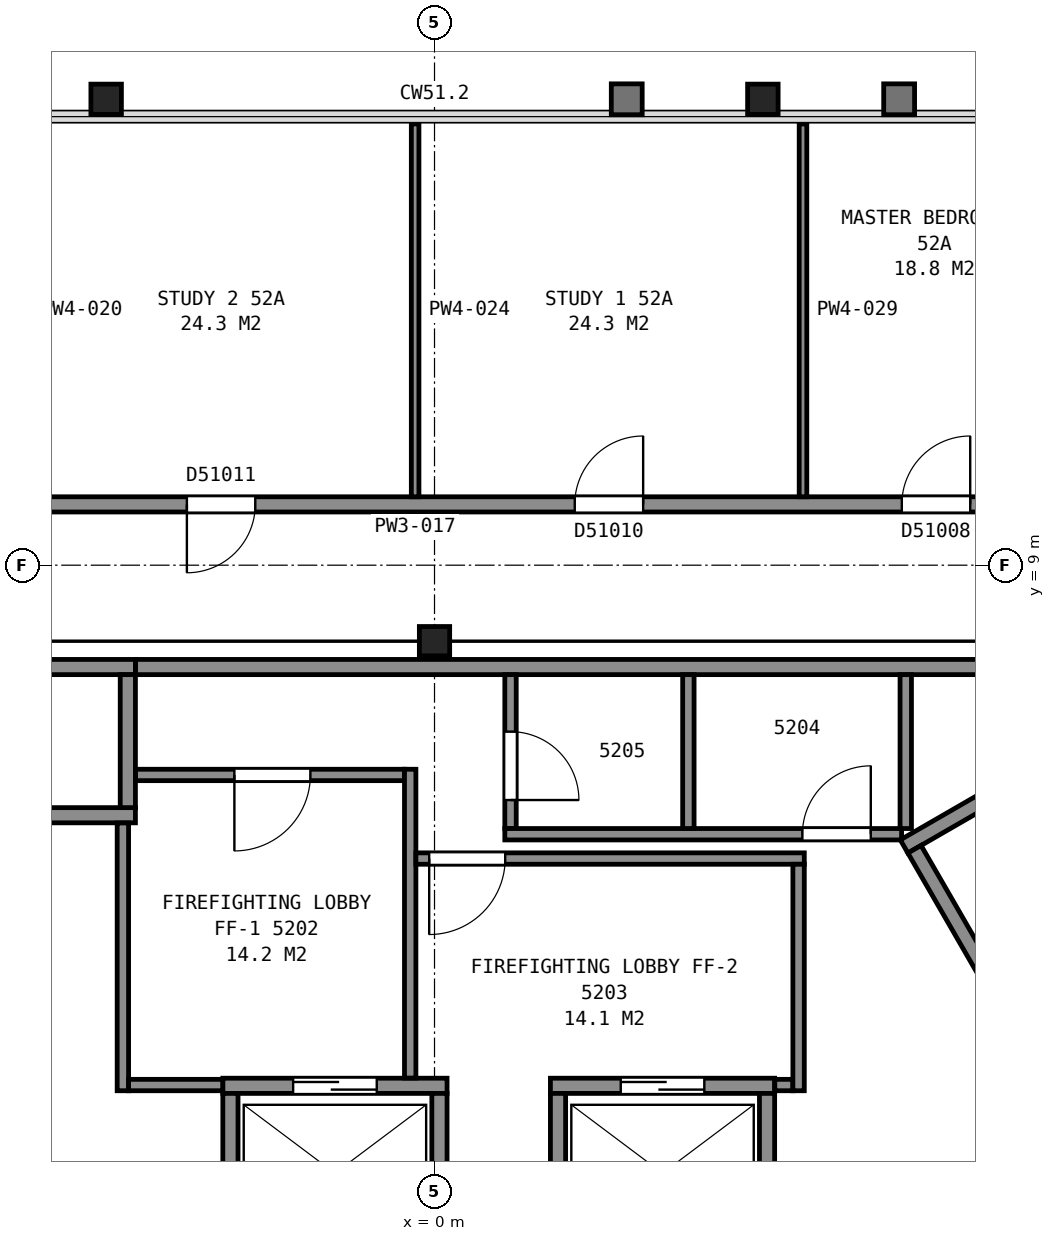
"""IFC4 building model, lengths in metres.
Left out: names, types, materials, properties, quantities, classifications, styles, units other than length and angle.
Written with IfcOpenShell. Run it as: python <this file> out.ifc"""

import sys

from ifc_helpers import new_model, si_unit, direction, frame, frame_2d, origin, origin_2d, place, context, subcontext, project, spatial, rectangle, i_section, extrude, element, fill, save


model = new_model("IFC4")
c1 = context("Model", 3, precision=1e-05, world=origin(), true_north=direction((0.0, 1.0)))
c2 = subcontext(c1, "Body", "Model", "MODEL_VIEW")
j1 = project(units=[si_unit("LENGTHUNIT", "METRE"), si_unit("PLANEANGLEUNIT", "RADIAN")], contexts=[c1])
p1 = place(None, origin())
s1 = spatial("IfcSite", under=j1, at=p1, CompositionType="ELEMENT")
p2 = place(p1, origin())
s2 = spatial("IfcBuilding", under=s1, at=p2, CompositionType="ELEMENT")
p3 = place(p2, frame((0.0, 0.0, 210.1)))
s3 = spatial("IfcBuildingStorey", under=s2, at=p3, CompositionType="ELEMENT", Elevation=210.1)
for number, where, z_axis, x_axis in (
    (1, (4.32, 15.13, 0.0), (0.0, 0.0, 1.0), (1.0, 0.0, 0.0)),
    (2, (-4.32, 15.13, 0.0), (0.0, 0.0, 1.0), (1.0, 0.0, 0.0)),
):
    element("IfcColumn", number, at=place(p3, frame(where, z_axis=z_axis, x_axis=x_axis)), inside=s3, PredefinedType="COLUMN", context=c2, shape_type="SweptSolid", body=[
        extrude(i_section(OverallWidth=0.401, OverallDepth=0.399, WebThickness=0.025, FlangeThickness=0.04, FilletRadius=0.015, at=origin_2d()), origin(), (0.0, 0.0, 1.0), 3.665),
    ])
p4 = place(p3, frame((0.0, 8.0, 0.0), z_axis=(0.0, 0.0, 1.0), x_axis=(1.0, 0.0, 0.0)))
e3 = element("IfcColumn", 3, at=p4, inside=s3, PredefinedType="COLUMN", context=c2, shape_type="SweptSolid", body=[
    extrude(i_section(OverallWidth=0.399, OverallDepth=0.386, WebThickness=0.021, FlangeThickness=0.033, FilletRadius=0.015, at=origin_2d()), origin(), (0.0, 0.0, 1.0), 3.7),
])
p5 = place(p3, frame((6.178, 5.299, 0.0), z_axis=(0.0, 0.0, 1.0), x_axis=(0.866019993635, 0.500009370536, 0.0)))
e4 = element("IfcWall", 4, at=p5, inside=s3, PredefinedType="PARTITIONING", context=c2, shape_type="SweptSolid", body=[
    extrude(rectangle(XDim=9.6, YDim=0.2, at=frame_2d((4.8, 0.0))), origin(), (0.0, 0.0, 1.0), 3.45),
])
p6 = place(p3, frame((7.715, 2.838, 0.0), z_axis=(0.0, 0.0, 1.0), x_axis=(-0.500049511043, 0.865996816683, 0.0)))
e5 = element("IfcWall", 5, at=p6, inside=s3, PredefinedType="PARTITIONING", context=c2, shape_type="SweptSolid", body=[
    extrude(rectangle(XDim=2.8, YDim=0.2, at=frame_2d((1.4, 0.0))), origin(), (0.0, 0.0, 1.0), 3.45),
])
p7 = place(p3, frame((-2.785, 2.15, 0.0), z_axis=(0.0, 0.0, 1.0), x_axis=(1.0, 0.0, 0.0)))
e6 = element("IfcWall", 6, at=p7, inside=s3, PredefinedType="PARTITIONING", context=c2, shape_type="SweptSolid", body=[
    extrude(rectangle(XDim=2.95, YDim=0.2, at=frame_2d((1.475, 0.0))), origin(), (0.0, 0.0, 1.0), 3.7),
])
p8 = place(p7, frame((0.925, 0.0, 0.0)))
e7 = element("IfcOpeningElement", 7, at=p8, cuts=e6, PredefinedType="OPENING", context=c2, shape_type="SweptSolid", body=[
    extrude(rectangle(XDim=1.1, YDim=2.1, at=frame_2d((0.55, 1.05))), frame((0.0, 0.11, 0.0), z_axis=(0.0, -1.0, 0.0), x_axis=(1.0, 0.0, 0.0)), (0.0, 0.0, 1.0), 0.22),
])
p9 = place(p3, frame((1.525, 2.15, 0.0), z_axis=(0.0, 0.0, 1.0), x_axis=(1.0, 0.0, 0.0)))
e8 = element("IfcWall", 8, at=p9, inside=s3, PredefinedType="PARTITIONING", context=c2, shape_type="SweptSolid", body=[
    extrude(rectangle(XDim=2.95, YDim=0.2, at=frame_2d((1.475, 0.0))), origin(), (0.0, 0.0, 1.0), 3.7),
])
p10 = place(p9, frame((0.925, 0.0, 0.0)))
e9 = element("IfcOpeningElement", 9, at=p10, cuts=e8, PredefinedType="OPENING", context=c2, shape_type="SweptSolid", body=[
    extrude(rectangle(XDim=1.1, YDim=2.1, at=frame_2d((0.55, 1.05))), frame((0.0, 0.11, 0.0), z_axis=(0.0, -1.0, 0.0), x_axis=(1.0, 0.0, 0.0)), (0.0, 0.0, 1.0), 0.22),
])
for number, where, z_axis, x_axis in (
    (10, (-6.285, 5.71, 0.0), (0.0, 0.0, 1.0), (1.0, 0.0, 0.0)),
    (11, (-6.285, 7.66, 0.0), (0.0, 0.0, 1.0), (1.0, 0.0, 0.0)),
):
    element("IfcWall", number, at=place(p3, frame(where, z_axis=z_axis, x_axis=x_axis)), inside=s3, PredefinedType="PARTITIONING", context=c2, shape_type="SweptSolid", body=[
        extrude(rectangle(XDim=2.35, YDim=0.2, at=frame_2d((1.175, 0.0))), origin(), (0.0, 0.0, 1.0), 3.7),
    ])
p11 = place(p3, frame((5.663, -1.612, 0.0), z_axis=(0.0, 0.0, 1.0), x_axis=(0.49998122708, 0.866036242063, 0.0)))
e12 = element("IfcWall", 12, at=p11, inside=s3, PredefinedType="PARTITIONING", context=c2, shape_type="SweptSolid", body=[
    extrude(rectangle(XDim=4.9, YDim=0.2, at=frame_2d((2.45, 0.0))), origin(), (0.0, 0.0, 1.0), 3.7),
])
for number, where, z_axis, x_axis in (
    (13, (4.375, 0.1, 0.0), (0.0, 0.0, 1.0), (0.0, 1.0, 0.0)),
    (14, (1.625, 0.1, 0.0), (0.0, 0.0, 1.0), (0.0, 1.0, 0.0)),
    (15, (0.065, 0.1, 0.0), (0.0, 0.0, 1.0), (0.0, 1.0, 0.0)),
    (16, (-2.685, 0.1, 0.0), (0.0, 0.0, 1.0), (0.0, 1.0, 0.0)),
):
    element("IfcWall", number, at=place(p3, frame(where, z_axis=z_axis, x_axis=x_axis)), inside=s3, PredefinedType="PARTITIONING", context=c2, shape_type="SweptSolid", body=[
        extrude(rectangle(XDim=1.95, YDim=0.2, at=frame_2d((0.975, 0.0))), origin(), (0.0, 0.0, 1.0), 3.7),
    ])
p12 = place(p3, frame((-4.035, 5.81, 0.0), z_axis=(0.0, 0.0, 1.0), x_axis=(0.0, 1.0, 0.0)))
e17 = element("IfcWall", 17, at=p12, inside=s3, PredefinedType="PARTITIONING", context=c2, shape_type="SweptSolid", body=[
    extrude(rectangle(XDim=1.75, YDim=0.2, at=frame_2d((0.875, 0.0))), origin(), (0.0, 0.0, 1.0), 3.7),
])
p13 = place(p3, frame((-4.1, 2.085, 0.0), z_axis=(0.0, 0.0, 1.0), x_axis=(0.0, 1.0, 0.0)))
e18 = element("IfcWall", 18, at=p13, inside=s3, PredefinedType="PARTITIONING", context=c2, shape_type="SweptSolid", body=[
    extrude(rectangle(XDim=3.523, YDim=0.15, at=frame_2d((1.761, 0.0))), origin(), (0.0, 0.0, 1.0), 3.45),
])
p14 = place(p3, frame((-4.025, 2.16, 0.0), z_axis=(0.0, 0.0, 1.0), x_axis=(1.0, 0.0, 0.0)))
e19 = element("IfcWall", 19, at=p14, inside=s3, PredefinedType="PARTITIONING", context=c2, shape_type="SweptSolid", body=[
    extrude(rectangle(XDim=1.238, YDim=0.15, at=frame_2d((0.619, 0.0))), origin(), (0.0, 0.0, 1.0), 3.45),
])
p15 = place(p3, frame((-3.933, 6.24, 0.0), z_axis=(0.0, 0.0, 1.0), x_axis=(1.0, 0.0, 0.0)))
e20 = element("IfcWall", 20, at=p15, inside=s3, PredefinedType="PARTITIONING", context=c2, shape_type="SweptSolid", body=[
    extrude(rectangle(XDim=3.538, YDim=0.15, at=frame_2d((1.769, 0.0))), origin(), (0.0, 0.0, 1.0), 3.45),
])
p16 = place(p15, frame((1.3, 0.0, 0.0)))
e21 = element("IfcOpeningElement", 21, at=p16, cuts=e20, PredefinedType="OPENING", context=c2, shape_type="SweptSolid", body=[
    extrude(rectangle(XDim=1.0, YDim=2.1, at=frame_2d((0.5, 1.05))), frame((0.0, 0.085, 0.0), z_axis=(0.0, -1.0, 0.0), x_axis=(1.0, 0.0, 0.0)), (0.0, 0.0, 1.0), 0.17),
])
p17 = place(p3, frame((-3.933, 7.66, 0.0), z_axis=(0.0, 0.0, 1.0), x_axis=(1.0, 0.0, 0.0)))
e22 = element("IfcWall", 22, at=p17, inside=s3, PredefinedType="PARTITIONING", context=c2, shape_type="SweptSolid", body=[
    extrude(rectangle(XDim=13.841, YDim=0.2, at=frame_2d((6.92, 0.0))), origin(), (0.0, 0.0, 1.0), 3.45),
])
p18 = place(p3, frame((-0.32, 2.252, 0.0), z_axis=(0.0, 0.0, 1.0), x_axis=(0.0, 1.0, 0.0)))
e23 = element("IfcWall", 23, at=p18, inside=s3, PredefinedType="PARTITIONING", context=c2, shape_type="SweptSolid", body=[
    extrude(rectangle(XDim=4.063, YDim=0.15, at=frame_2d((2.031, 0.0))), origin(), (0.0, 0.0, 1.0), 3.45),
])
p19 = place(p3, frame((-0.245, 5.14, 0.0), z_axis=(0.0, 0.0, 1.0), x_axis=(1.0, 0.0, 0.0)))
e24 = element("IfcWall", 24, at=p19, inside=s3, PredefinedType="PARTITIONING", context=c2, shape_type="SweptSolid", body=[
    extrude(rectangle(XDim=5.11, YDim=0.15, at=frame_2d((2.555, 0.0))), origin(), (0.0, 0.0, 1.0), 3.45),
])
p20 = place(p19, frame((0.175, 0.0, 0.0)))
e25 = element("IfcOpeningElement", 25, at=p20, cuts=e24, PredefinedType="OPENING", context=c2, shape_type="SweptSolid", body=[
    extrude(rectangle(XDim=1.0, YDim=2.1, at=frame_2d((0.5, 1.05))), frame((0.0, 0.085, 0.0), z_axis=(0.0, -1.0, 0.0), x_axis=(1.0, 0.0, 0.0)), (0.0, 0.0, 1.0), 0.17),
])
p21 = place(p3, frame((1.0, 7.56, 0.0), z_axis=(0.0, 0.0, 1.0), x_axis=(0.0, -1.0, 0.0)))
e26 = element("IfcWall", 26, at=p21, inside=s3, PredefinedType="PARTITIONING", context=c2, shape_type="SweptSolid", body=[
    extrude(rectangle(XDim=2.025, YDim=0.15, at=frame_2d((1.013, 0.0))), origin(), (0.0, 0.0, 1.0), 3.45),
])
p22 = place(p21, frame((0.75, 0.0, 0.0)))
e27 = element("IfcOpeningElement", 27, at=p22, cuts=e26, PredefinedType="OPENING", context=c2, shape_type="SweptSolid", body=[
    extrude(rectangle(XDim=0.9, YDim=2.1, at=frame_2d((0.45, 1.05))), frame((0.0, 0.085, 0.0), z_axis=(0.0, -1.0, 0.0), x_axis=(1.0, 0.0, 0.0)), (0.0, 0.0, 1.0), 0.17),
])
p23 = place(p3, frame((0.925, 5.46, 0.0), z_axis=(0.0, 0.0, 1.0), x_axis=(1.0, 0.0, 0.0)))
e28 = element("IfcWall", 28, at=p23, inside=s3, PredefinedType="PARTITIONING", context=c2, shape_type="SweptSolid", body=[
    extrude(rectangle(XDim=5.22, YDim=0.15, at=frame_2d((2.61, 0.0))), origin(), (0.0, 0.0, 1.0), 3.45),
])
p24 = place(p23, frame((3.915, 0.0, 0.0)))
e29 = element("IfcOpeningElement", 29, at=p24, cuts=e28, PredefinedType="OPENING", context=c2, shape_type="SweptSolid", body=[
    extrude(rectangle(XDim=0.9, YDim=2.1, at=frame_2d((0.45, 1.05))), frame((0.0, 0.085, 0.0), z_axis=(0.0, -1.0, 0.0), x_axis=(1.0, 0.0, 0.0)), (0.0, 0.0, 1.0), 0.17),
])
p25 = place(p3, frame((3.34, 5.535, 0.0), z_axis=(0.0, 0.0, 1.0), x_axis=(0.0, 1.0, 0.0)))
e30 = element("IfcWall", 30, at=p25, inside=s3, PredefinedType="PARTITIONING", context=c2, shape_type="SweptSolid", body=[
    extrude(rectangle(XDim=2.025, YDim=0.15, at=frame_2d((1.013, 0.0))), origin(), (0.0, 0.0, 1.0), 3.45),
])
p26 = place(p3, frame((4.477, 2.16, 0.0), z_axis=(0.0, 0.0, 1.0), x_axis=(1.0, 0.0, 0.0)))
e31 = element("IfcWall", 31, at=p26, inside=s3, PredefinedType="PARTITIONING", context=c2, shape_type="SweptSolid", body=[
    extrude(rectangle(XDim=0.238, YDim=0.15, at=frame_2d((0.119, 0.0))), origin(), (0.0, 0.0, 1.0), 3.45),
])
p27 = place(p3, frame((4.79, 2.085, 0.0), z_axis=(0.0, 0.0, 1.0), x_axis=(0.0, 1.0, 0.0)))
e32 = element("IfcWall", 32, at=p27, inside=s3, PredefinedType="PARTITIONING", context=c2, shape_type="SweptSolid", body=[
    extrude(rectangle(XDim=2.98, YDim=0.15, at=frame_2d((1.49, 0.0))), origin(), (0.0, 0.0, 1.0), 3.45),
])
p28 = place(p3, frame((6.2, 5.535, 0.0), z_axis=(0.0, 0.0, 1.0), x_axis=(0.0, 1.0, 0.0)))
e33 = element("IfcWall", 33, at=p28, inside=s3, PredefinedType="PARTITIONING", context=c2, shape_type="SweptSolid", body=[
    extrude(rectangle(XDim=2.025, YDim=0.15, at=frame_2d((1.013, 0.0))), origin(), (0.0, 0.0, 1.0), 3.45),
])
p29 = place(p3, frame((-4.075, -12.545, 0.0), z_axis=(0.0, 0.0, 1.0), x_axis=(-0.499999743747, 0.866025551732, 0.0)))
e34 = element("IfcWall", 34, at=p29, inside=s3, PredefinedType="PARTITIONING", context=c2, shape_type="SweptSolid", body=[
    extrude(rectangle(XDim=17.656, YDim=0.2, at=frame_2d((8.828, 0.0))), origin(), (0.0, 0.0, 1.0), 2.713),
])
p30 = place(p29, frame((9.895, 0.0, 0.0)))
e35 = element("IfcOpeningElement", 35, at=p30, cuts=e34, PredefinedType="OPENING", context=c2, shape_type="SweptSolid", body=[
    extrude(rectangle(XDim=0.9, YDim=2.1, at=frame_2d((0.45, 1.05))), frame((0.0, 0.11, 0.0), z_axis=(0.0, -1.0, 0.0), x_axis=(1.0, 0.0, 0.0)), (0.0, 0.0, 1.0), 0.22),
])
p31 = place(p29, frame((6.622, 0.0, 0.0)))
e36 = element("IfcOpeningElement", 36, at=p31, cuts=e34, PredefinedType="OPENING", context=c2, shape_type="SweptSolid", body=[
    extrude(rectangle(XDim=0.9, YDim=2.1, at=frame_2d((0.45, 1.05))), frame((0.0, 0.11, 0.0), z_axis=(0.0, -1.0, 0.0), x_axis=(1.0, 0.0, 0.0)), (0.0, 0.0, 1.0), 0.22),
])
p32 = place(p29, frame((0.268, 0.0, 0.0)))
e37 = element("IfcOpeningElement", 37, at=p32, cuts=e34, PredefinedType="OPENING", context=c2, shape_type="SweptSolid", body=[
    extrude(rectangle(XDim=0.9, YDim=2.1, at=frame_2d((0.45, 1.05))), frame((0.0, 0.11, 0.0), z_axis=(0.0, -1.0, 0.0), x_axis=(1.0, 0.0, 0.0)), (0.0, 0.0, 1.0), 0.22),
])
p33 = place(p3, frame((-8.828, 9.8, 0.0), z_axis=(0.0, 0.0, 1.0), x_axis=(1.0, 0.0, 0.0)))
e38 = element("IfcWall", 38, at=p33, inside=s3, PredefinedType="PARTITIONING", context=c2, shape_type="SweptSolid", body=[
    extrude(rectangle(XDim=17.706, YDim=0.2, at=frame_2d((8.853, 0.0))), origin(), (0.0, 0.0, 1.0), 2.713),
])
p34 = place(p33, frame((14.976, 0.0, 0.0)))
e39 = element("IfcOpeningElement", 39, at=p34, cuts=e38, PredefinedType="OPENING", context=c2, shape_type="SweptSolid", body=[
    extrude(rectangle(XDim=0.9, YDim=2.1, at=frame_2d((0.45, 1.05))), frame((0.0, 0.11, 0.0), z_axis=(0.0, -1.0, 0.0), x_axis=(1.0, 0.0, 0.0)), (0.0, 0.0, 1.0), 0.22),
])
p35 = place(p33, frame((10.673, 0.0, 0.0)))
e40 = element("IfcOpeningElement", 40, at=p35, cuts=e38, PredefinedType="OPENING", context=c2, shape_type="SweptSolid", body=[
    extrude(rectangle(XDim=0.9, YDim=2.1, at=frame_2d((0.45, 1.05))), frame((0.0, 0.11, 0.0), z_axis=(0.0, -1.0, 0.0), x_axis=(1.0, 0.0, 0.0)), (0.0, 0.0, 1.0), 0.22),
])
p36 = place(p33, frame((5.57, 0.0, 0.0)))
e41 = element("IfcOpeningElement", 41, at=p36, cuts=e38, PredefinedType="OPENING", context=c2, shape_type="SweptSolid", body=[
    extrude(rectangle(XDim=0.9, YDim=2.1, at=frame_2d((0.45, 1.05))), frame((0.0, 0.11, 0.0), z_axis=(0.0, -1.0, 0.0), x_axis=(1.0, 0.0, 0.0)), (0.0, 0.0, 1.0), 0.22),
])
p37 = place(p33, frame((1.3, 0.0, 0.0)))
e42 = element("IfcOpeningElement", 42, at=p37, cuts=e38, PredefinedType="OPENING", context=c2, shape_type="SweptSolid", body=[
    extrude(rectangle(XDim=0.9, YDim=2.1, at=frame_2d((0.45, 1.05))), frame((0.0, 0.11, 0.0), z_axis=(0.0, -1.0, 0.0), x_axis=(1.0, 0.0, 0.0)), (0.0, 0.0, 1.0), 0.22),
])
p38 = place(p3, frame((-0.255, 9.9, 0.0), z_axis=(0.0, 0.0, 1.0), x_axis=(0.0, 1.0, 0.0)))
e43 = element("IfcWall", 43, at=p38, inside=s3, PredefinedType="PARTITIONING", context=c2, shape_type="SweptSolid", body=[
    extrude(rectangle(XDim=4.906, YDim=0.1, at=frame_2d((2.453, 0.0))), origin(), (0.0, 0.0, 1.0), 2.713),
])
p39 = place(p3, frame((12.903, 2.745, 0.0), z_axis=(0.0, 0.0, 1.0), x_axis=(-0.499999743747, -0.866025551732, 0.0)))
e44 = element("IfcWall", 44, at=p39, inside=s3, PredefinedType="PARTITIONING", context=c2, shape_type="SweptSolid", body=[
    extrude(rectangle(XDim=17.656, YDim=0.2, at=frame_2d((8.828, 0.0))), origin(), (0.0, 0.0, 1.0), 2.713),
])
p40 = place(p39, frame((12.756, 0.0, 0.0)))
e45 = element("IfcOpeningElement", 45, at=p40, cuts=e44, PredefinedType="OPENING", context=c2, shape_type="SweptSolid", body=[
    extrude(rectangle(XDim=1.2, YDim=2.1, at=frame_2d((0.6, 1.05))), frame((0.0, 0.11, 0.0), z_axis=(0.0, -1.0, 0.0), x_axis=(1.0, 0.0, 0.0)), (0.0, 0.0, 1.0), 0.22),
])
p41 = place(p39, frame((7.044, 0.0, 0.0)))
e46 = element("IfcOpeningElement", 46, at=p41, cuts=e44, PredefinedType="OPENING", context=c2, shape_type="SweptSolid", body=[
    extrude(rectangle(XDim=0.9, YDim=2.1, at=frame_2d((0.45, 1.05))), frame((0.0, 0.11, 0.0), z_axis=(0.0, -1.0, 0.0), x_axis=(1.0, 0.0, 0.0)), (0.0, 0.0, 1.0), 0.22),
])
p42 = place(p39, frame((0.417, 0.0, 0.0)))
e47 = element("IfcOpeningElement", 47, at=p42, cuts=e44, PredefinedType="OPENING", context=c2, shape_type="SweptSolid", body=[
    extrude(rectangle(XDim=0.9, YDim=2.1, at=frame_2d((0.45, 1.05))), frame((0.0, 0.11, 0.0), z_axis=(0.0, -1.0, 0.0), x_axis=(1.0, 0.0, 0.0)), (0.0, 0.0, 1.0), 0.22),
])
p43 = place(p3, frame((4.848, 9.9, 0.0), z_axis=(0.0, 0.0, 1.0), x_axis=(0.0, 1.0, 0.0)))
e48 = element("IfcWall", 48, at=p43, inside=s3, PredefinedType="PARTITIONING", context=c2, shape_type="SweptSolid", body=[
    extrude(rectangle(XDim=4.906, YDim=0.1, at=frame_2d((2.453, 0.0))), origin(), (0.0, 0.0, 1.0), 2.713),
])
p44 = place(p8, origin())
e49 = element("IfcDoor", 49, at=p44, inside=s3, OperationType="SLIDING_TO_LEFT", PredefinedType="DOOR", context=c2, shape_type="SweptSolid", body=[
    extrude(rectangle(XDim=1.1, YDim=2.1, at=frame_2d((0.55, 1.05))), frame((0.0, 0.025, 0.0), z_axis=(0.0, -1.0, 0.0), x_axis=(1.0, 0.0, 0.0)), (0.0, 0.0, 1.0), 0.05),
])
fill(e7, e49)
p45 = place(p10, origin())
e50 = element("IfcDoor", 50, at=p45, inside=s3, OperationType="SLIDING_TO_RIGHT", PredefinedType="DOOR", context=c2, shape_type="SweptSolid", body=[
    extrude(rectangle(XDim=1.1, YDim=2.1, at=frame_2d((0.55, 1.05))), frame((0.0, 0.025, 0.0), z_axis=(0.0, -1.0, 0.0), x_axis=(1.0, 0.0, 0.0)), (0.0, 0.0, 1.0), 0.05),
])
fill(e9, e50)
p46 = place(p16, origin())
e51 = element("IfcDoor", 51, at=p46, inside=s3, OperationType="SINGLE_SWING_LEFT", PredefinedType="DOOR", context=c2, shape_type="SweptSolid", body=[
    extrude(rectangle(XDim=1.0, YDim=2.1, at=frame_2d((0.5, 1.05))), frame((0.0, 0.025, 0.0), z_axis=(0.0, -1.0, 0.0), x_axis=(1.0, 0.0, 0.0)), (0.0, 0.0, 1.0), 0.05),
])
fill(e21, e51)
p47 = place(p20, origin())
e52 = element("IfcDoor", 52, at=p47, inside=s3, OperationType="SINGLE_SWING_LEFT", PredefinedType="DOOR", context=c2, shape_type="SweptSolid", body=[
    extrude(rectangle(XDim=1.0, YDim=2.1, at=frame_2d((0.5, 1.05))), frame((0.0, 0.025, 0.0), z_axis=(0.0, -1.0, 0.0), x_axis=(1.0, 0.0, 0.0)), (0.0, 0.0, 1.0), 0.05),
])
fill(e25, e52)
p48 = place(p22, origin())
e53 = element("IfcDoor", 53, at=p48, inside=s3, OperationType="SINGLE_SWING_RIGHT", PredefinedType="DOOR", context=c2, shape_type="SweptSolid", body=[
    extrude(rectangle(XDim=0.9, YDim=2.1, at=frame_2d((0.45, 1.05))), frame((0.0, 0.025, 0.0), z_axis=(0.0, -1.0, 0.0), x_axis=(1.0, 0.0, 0.0)), (0.0, 0.0, 1.0), 0.05),
])
fill(e27, e53)
p49 = place(p24, origin())
e54 = element("IfcDoor", 54, at=p49, inside=s3, OperationType="SINGLE_SWING_RIGHT", PredefinedType="DOOR", context=c2, shape_type="SweptSolid", body=[
    extrude(rectangle(XDim=0.9, YDim=2.1, at=frame_2d((0.45, 1.05))), frame((0.0, 0.025, 0.0), z_axis=(0.0, -1.0, 0.0), x_axis=(1.0, 0.0, 0.0)), (0.0, 0.0, 1.0), 0.05),
])
fill(e29, e54)
p50 = place(p34, origin())
e55 = element("IfcDoor", 55, at=p50, inside=s3, OperationType="SINGLE_SWING_RIGHT", PredefinedType="DOOR", context=c2, shape_type="SweptSolid", body=[
    extrude(rectangle(XDim=0.9, YDim=2.1, at=frame_2d((0.45, 1.05))), frame((0.0, 0.025, 0.0), z_axis=(0.0, -1.0, 0.0), x_axis=(1.0, 0.0, 0.0)), (0.0, 0.0, 1.0), 0.05),
])
fill(e39, e55)
p51 = place(p35, origin())
e56 = element("IfcDoor", 56, at=p51, inside=s3, OperationType="SINGLE_SWING_RIGHT", PredefinedType="DOOR", context=c2, shape_type="SweptSolid", body=[
    extrude(rectangle(XDim=0.9, YDim=2.1, at=frame_2d((0.45, 1.05))), frame((0.0, 0.025, 0.0), z_axis=(0.0, -1.0, 0.0), x_axis=(1.0, 0.0, 0.0)), (0.0, 0.0, 1.0), 0.05),
])
fill(e40, e56)
p52 = place(p36, origin())
e57 = element("IfcDoor", 57, at=p52, inside=s3, OperationType="SINGLE_SWING_LEFT", PredefinedType="DOOR", context=c2, shape_type="SweptSolid", body=[
    extrude(rectangle(XDim=0.9, YDim=2.1, at=frame_2d((0.45, 1.05))), frame((0.0, 0.025, 0.0), z_axis=(0.0, -1.0, 0.0), x_axis=(1.0, 0.0, 0.0)), (0.0, 0.0, 1.0), 0.05),
])
fill(e41, e57)
save(model, sys.argv[1])
